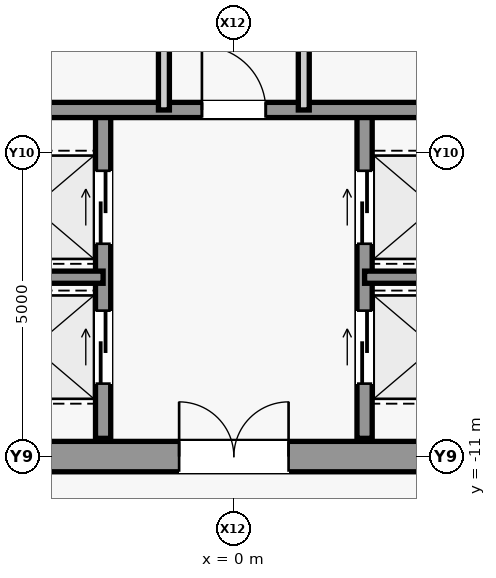
"""IFC4 building model, lengths in metres.
Left out: names, types, materials, properties, quantities, classifications, styles, units other than length and angle.
Written with IfcOpenShell. Run it as: python <this file> out.ifc"""

import sys

from ifc_helpers import new_model, si_unit, direction, frame, frame_2d, origin, place, context, subcontext, project, spatial, rectangle, extrude, source, transform, mapped, element, fill, save


model = new_model("IFC4")
c1 = context("Model", 3, precision=1e-05, world=origin(), true_north=direction((0.0, 1.0)))
c2 = subcontext(c1, "Body", "Model", "MODEL_VIEW")
j1 = project(units=[si_unit("LENGTHUNIT", "METRE"), si_unit("PLANEANGLEUNIT", "RADIAN")], contexts=[c1])
p1 = place(None, origin())
s1 = spatial("IfcSite", under=j1, at=p1, CompositionType="ELEMENT")
p2 = place(p1, origin())
s2 = spatial("IfcBuilding", under=s1, at=p2, CompositionType="ELEMENT")
p3 = place(p2, frame((0.0, 0.0, 140.6)))
s3 = spatial("IfcBuildingStorey", under=s2, at=p3, CompositionType="ELEMENT", Elevation=140.6)
m1 = source(origin(), c2, "Body", "SweptSolid", [
    extrude(rectangle(XDim=9.2, YDim=0.5, at=frame_2d((4.6, 0.0))), origin(), (0.0, 0.0, 1.0), 3.84),
])
p4 = place(p3, frame((-4.6, -11.0, 0.0), z_axis=(0.0, 0.0, 1.0), x_axis=(1.0, 0.0, 0.0)))
e1 = element("IfcWall", 1, at=p4, inside=s3, PredefinedType="SHEAR", context=c2, shape_type="MappedRepresentation", body=[
    mapped(m1, transform((0.0, 0.0, 0.0), scale=1.0)),
])
m2 = source(origin(), c2, "Body", "SweptSolid", [
    extrude(rectangle(XDim=1.8, YDim=2.25, at=frame_2d((0.9, 1.125))), frame((0.0, 0.26, 0.0), z_axis=(0.0, -1.0, 0.0), x_axis=(1.0, 0.0, 0.0)), (0.0, 0.0, 1.0), 0.52),
])
p5 = place(p4, frame((3.7, 0.0, 0.0)))
e2 = element("IfcOpeningElement", 2, at=p5, cuts=e1, PredefinedType="OPENING", context=c2, shape_type="MappedRepresentation", body=[
    mapped(m2, transform((0.0, 0.0, 0.0), scale=1.0)),
])
m3 = source(origin(), c2, "Body", "SweptSolid", [
    extrude(rectangle(XDim=5.4, YDim=0.25, at=frame_2d((2.7, 0.0))), origin(), (0.0, 0.0, 1.0), 3.84),
])
p6 = place(p3, frame((-2.15, -10.7, 0.0), z_axis=(0.0, 0.0, 1.0), x_axis=(0.0, 1.0, 0.0)))
e3 = element("IfcWall", 3, at=p6, inside=s3, PredefinedType="SHEAR", context=c2, shape_type="MappedRepresentation", body=[
    mapped(m3, transform((0.0, 0.0, 0.0), scale=1.0)),
])
m4 = source(origin(), c2, "Body", "SweptSolid", [
    extrude(rectangle(XDim=1.2, YDim=2.3, at=frame_2d((0.6, 1.15))), frame((0.0, 0.135, 0.0), z_axis=(0.0, -1.0, 0.0), x_axis=(1.0, 0.0, 0.0)), (0.0, 0.0, 1.0), 0.27),
])
p7 = place(p6, frame((0.9, 0.0, 0.0)))
e4 = element("IfcOpeningElement", 4, at=p7, cuts=e3, PredefinedType="OPENING", context=c2, shape_type="MappedRepresentation", body=[
    mapped(m4, transform((0.0, 0.0, 0.0), scale=1.0)),
])
p8 = place(p6, frame((3.2, 0.0, 0.0)))
e5 = element("IfcOpeningElement", 5, at=p8, cuts=e3, PredefinedType="OPENING", context=c2, shape_type="MappedRepresentation", body=[
    mapped(m4, transform((0.0, 0.0, 0.0), scale=1.0)),
])
p9 = place(p3, frame((2.15, -10.7, 0.0), z_axis=(0.0, 0.0, 1.0), x_axis=(0.0, 1.0, 0.0)))
e6 = element("IfcWall", 6, at=p9, inside=s3, PredefinedType="SHEAR", context=c2, shape_type="MappedRepresentation", body=[
    mapped(m3, transform((0.0, 0.0, 0.0), scale=1.0)),
])
p10 = place(p9, frame((0.9, 0.0, 0.0)))
e7 = element("IfcOpeningElement", 7, at=p10, cuts=e6, PredefinedType="OPENING", context=c2, shape_type="MappedRepresentation", body=[
    mapped(m4, transform((0.0, 0.0, 0.0), scale=1.0)),
])
p11 = place(p9, frame((3.2, 0.0, 0.0)))
e8 = element("IfcOpeningElement", 8, at=p11, cuts=e6, PredefinedType="OPENING", context=c2, shape_type="MappedRepresentation", body=[
    mapped(m4, transform((0.0, 0.0, 0.0), scale=1.0)),
])
m5 = source(origin(), c2, "Body", "SweptSolid", [
    extrude(rectangle(XDim=2.45, YDim=0.2, at=frame_2d((1.225, 0.0))), origin(), (0.0, 0.0, 1.0), 3.84),
])
for number, where, z_axis, x_axis in (
    (9, (-4.6, -8.05, 0.0), (0.0, 0.0, 1.0), (1.0, 0.0, 0.0)),
    (10, (2.15, -8.05, 0.0), (0.0, 0.0, 1.0), (1.0, 0.0, 0.0)),
):
    element("IfcWall", number, at=place(p3, frame(where, z_axis=z_axis, x_axis=x_axis)), inside=s3, PredefinedType="SHEAR", context=c2, shape_type="MappedRepresentation", body=[
        mapped(m5, transform((0.0, 0.0, 0.0), scale=1.0)),
    ])
m6 = source(origin(), c2, "Body", "SweptSolid", [
    extrude(rectangle(XDim=9.2, YDim=0.25, at=frame_2d((4.6, 0.0))), origin(), (0.0, 0.0, 1.0), 3.84),
])
p12 = place(p3, frame((-4.6, -5.3, 0.0), z_axis=(0.0, 0.0, 1.0), x_axis=(1.0, 0.0, 0.0)))
e11 = element("IfcWall", 11, at=p12, inside=s3, PredefinedType="SHEAR", context=c2, shape_type="MappedRepresentation", body=[
    mapped(m6, transform((0.0, 0.0, 0.0), scale=1.0)),
])
m7 = source(origin(), c2, "Body", "SweptSolid", [
    extrude(rectangle(XDim=1.05, YDim=2.2, at=frame_2d((0.525, 1.1))), frame((0.0, 0.135, 0.0), z_axis=(0.0, -1.0, 0.0), x_axis=(1.0, 0.0, 0.0)), (0.0, 0.0, 1.0), 0.27),
])
p13 = place(p12, frame((4.075, 0.0, 0.0)))
e12 = element("IfcOpeningElement", 12, at=p13, cuts=e11, PredefinedType="OPENING", context=c2, shape_type="MappedRepresentation", body=[
    mapped(m7, transform((0.0, 0.0, 0.0), scale=1.0)),
])
m8 = source(origin(), c2, "Body", "SweptSolid", [
    extrude(rectangle(XDim=10.6, YDim=0.18, at=frame_2d((5.3, 0.0))), origin(), (0.0, 0.0, 1.0), 3.84),
])
p14 = place(p3, frame((-1.15, -5.3, 0.0), z_axis=(0.0, 0.0, 1.0), x_axis=(0.0, 1.0, 0.0)))
e13 = element("IfcWall", 13, at=p14, inside=s3, PredefinedType="PARTITIONING", context=c2, shape_type="MappedRepresentation", body=[
    mapped(m8, transform((0.0, 0.0, 0.0), scale=1.0)),
])
m9 = source(origin(), c2, "Body", "SweptSolid", [
    extrude(rectangle(XDim=0.9, YDim=2.15, at=frame_2d((0.45, 1.075))), frame((0.0, 0.1, 0.0), z_axis=(0.0, -1.0, 0.0), x_axis=(1.0, 0.0, 0.0)), (0.0, 0.0, 1.0), 0.2),
])
p15 = place(p14, frame((4.2, 0.0, 0.0)))
e14 = element("IfcOpeningElement", 14, at=p15, cuts=e13, PredefinedType="OPENING", context=c2, shape_type="MappedRepresentation", body=[
    mapped(m9, transform((0.0, 0.0, 0.0), scale=1.0)),
])
p16 = place(p14, frame((9.475, 0.0, 0.0)))
e15 = element("IfcOpeningElement", 15, at=p16, cuts=e13, PredefinedType="OPENING", context=c2, shape_type="MappedRepresentation", body=[
    mapped(m9, transform((0.0, 0.0, 0.0), scale=1.0)),
])
p17 = place(p3, frame((1.15, -5.3, 0.0), z_axis=(0.0, 0.0, 1.0), x_axis=(0.0, 1.0, 0.0)))
e16 = element("IfcWall", 16, at=p17, inside=s3, PredefinedType="PARTITIONING", context=c2, shape_type="MappedRepresentation", body=[
    mapped(m8, transform((0.0, 0.0, 0.0), scale=1.0)),
])
p18 = place(p17, frame((1.15, 0.0, 0.0)))
e17 = element("IfcOpeningElement", 17, at=p18, cuts=e16, PredefinedType="OPENING", context=c2, shape_type="MappedRepresentation", body=[
    mapped(m9, transform((0.0, 0.0, 0.0), scale=1.0)),
])
p19 = place(p17, frame((4.6, 0.0, 0.0)))
e18 = element("IfcOpeningElement", 18, at=p19, cuts=e16, PredefinedType="OPENING", context=c2, shape_type="MappedRepresentation", body=[
    mapped(m9, transform((0.0, 0.0, 0.0), scale=1.0)),
])
p20 = place(p17, frame((7.65, 0.0, 0.0)))
e19 = element("IfcOpeningElement", 19, at=p20, cuts=e16, PredefinedType="OPENING", context=c2, shape_type="MappedRepresentation", body=[
    mapped(m9, transform((0.0, 0.0, 0.0), scale=1.0)),
])
p21 = place(p17, frame((9.475, 0.0, 0.0)))
e20 = element("IfcOpeningElement", 20, at=p21, cuts=e16, PredefinedType="OPENING", context=c2, shape_type="MappedRepresentation", body=[
    mapped(m9, transform((0.0, 0.0, 0.0), scale=1.0)),
])
m10 = source(origin(), c2, "Body", "SweptSolid", [
    extrude(rectangle(XDim=1.05, YDim=2.2, at=frame_2d((0.525, 1.1))), frame((0.0, 0.025, 0.0), z_axis=(0.0, -1.0, 0.0), x_axis=(1.0, 0.0, 0.0)), (0.0, 0.0, 1.0), 0.05),
])
p22 = place(p13, origin())
e21 = element("IfcDoor", 21, at=p22, inside=s3, OperationType="SINGLE_SWING_LEFT", PredefinedType="DOOR", context=c2, shape_type="MappedRepresentation", body=[
    mapped(m10, transform((0.0, 0.0, 0.0), scale=1.0)),
])
fill(e12, e21)
m11 = source(origin(), c2, "Body", "SweptSolid", [
    extrude(rectangle(XDim=1.8, YDim=2.25, at=frame_2d((0.9, 1.125))), frame((0.0, 0.025, 0.0), z_axis=(0.0, -1.0, 0.0), x_axis=(1.0, 0.0, 0.0)), (0.0, 0.0, 1.0), 0.05),
])
p23 = place(p5, origin())
e22 = element("IfcDoor", 22, at=p23, inside=s3, OperationType="SINGLE_SWING_LEFT", PredefinedType="DOOR", context=c2, shape_type="MappedRepresentation", body=[
    mapped(m11, transform((0.0, 0.0, 0.0), scale=1.0)),
])
fill(e2, e22)
m12 = source(origin(), c2, "Body", "SweptSolid", [
    extrude(rectangle(XDim=1.2, YDim=2.3, at=frame_2d((0.6, 1.15))), frame((0.0, 0.025, 0.0), z_axis=(0.0, -1.0, 0.0), x_axis=(1.0, 0.0, 0.0)), (0.0, 0.0, 1.0), 0.05),
])
p24 = place(p7, origin())
e23 = element("IfcDoor", 23, at=p24, inside=s3, OperationType="SLIDING_TO_LEFT", PredefinedType="DOOR", context=c2, shape_type="MappedRepresentation", body=[
    mapped(m12, transform((0.0, 0.0, 0.0), scale=1.0)),
])
fill(e4, e23)
p25 = place(p10, origin())
e24 = element("IfcDoor", 24, at=p25, inside=s3, OperationType="SLIDING_TO_LEFT", PredefinedType="DOOR", context=c2, shape_type="MappedRepresentation", body=[
    mapped(m12, transform((0.0, 0.0, 0.0), scale=1.0)),
])
fill(e7, e24)
p26 = place(p8, origin())
e25 = element("IfcDoor", 25, at=p26, inside=s3, OperationType="SLIDING_TO_LEFT", PredefinedType="DOOR", context=c2, shape_type="MappedRepresentation", body=[
    mapped(m12, transform((0.0, 0.0, 0.0), scale=1.0)),
])
fill(e5, e25)
p27 = place(p11, origin())
e26 = element("IfcDoor", 26, at=p27, inside=s3, OperationType="SLIDING_TO_LEFT", PredefinedType="DOOR", context=c2, shape_type="MappedRepresentation", body=[
    mapped(m12, transform((0.0, 0.0, 0.0), scale=1.0)),
])
fill(e8, e26)
save(model, sys.argv[1])
